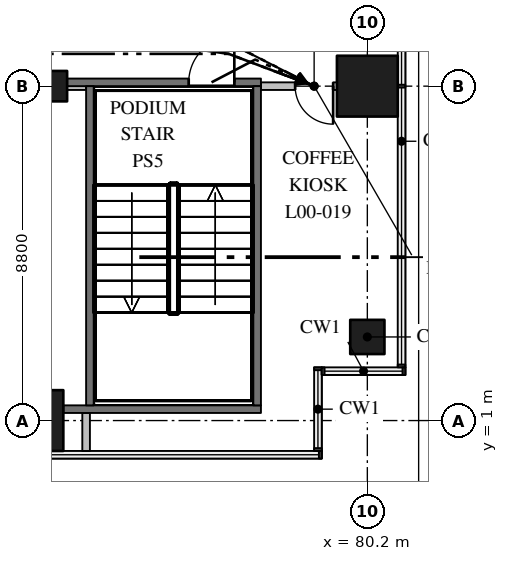
"""IFC4 building model, lengths in metres.
Left out: names, types, materials, properties, quantities, classifications, styles, units other than length and angle.
Written with IfcOpenShell. Run it as: python <this file> out.ifc"""

import sys

from ifc_helpers import new_model, si_unit, direction, frame, frame_2d, origin, origin_2d, place, context, subcontext, project, spatial, rectangle, extrude, element, fill, save


model = new_model("IFC4")
c1 = context("Model", 3, precision=1e-05, world=origin(), true_north=direction((0.0, 1.0)))
c2 = subcontext(c1, "Body", "Model", "MODEL_VIEW")
j1 = project(units=[si_unit("LENGTHUNIT", "METRE"), si_unit("PLANEANGLEUNIT", "RADIAN")], contexts=[c1])
p1 = place(None, origin())
s1 = spatial("IfcSite", under=j1, at=p1, CompositionType="ELEMENT")
p2 = place(p1, origin())
s2 = spatial("IfcBuilding", under=s1, at=p2, CompositionType="ELEMENT")
p3 = place(p2, origin())
s3 = spatial("IfcBuildingStorey", under=s2, at=p3, CompositionType="ELEMENT", Elevation=0.0)
p4 = place(p3, frame((71.4, 1.0, 0.0), z_axis=(0.0, 0.0, 1.0), x_axis=(1.0, 0.0, 0.0)))
e1 = element("IfcColumn", 1, at=p4, inside=s3, PredefinedType="COLUMN", context=c2, shape_type="SweptSolid", body=[
    extrude(rectangle(XDim=1.6, YDim=1.6, at=origin_2d()), origin(), (0.0, 0.0, 1.0), 7.5),
])
p5 = place(p3, frame((71.4, 9.8, 0.0), z_axis=(0.0, 0.0, 1.0), x_axis=(1.0, 0.0, 0.0)))
e2 = element("IfcColumn", 2, at=p5, inside=s3, PredefinedType="COLUMN", context=c2, shape_type="SweptSolid", body=[
    extrude(rectangle(XDim=1.8, YDim=0.8, at=origin_2d()), origin(), (0.0, 0.0, 1.0), 7.5),
])
p6 = place(p3, frame((80.2, 3.2, 0.0), z_axis=(0.0, 0.0, 1.0), x_axis=(1.0, 0.0, 0.0)))
e3 = element("IfcColumn", 3, at=p6, inside=s3, PredefinedType="COLUMN", context=c2, shape_type="SweptSolid", body=[
    extrude(rectangle(XDim=0.9, YDim=0.9, at=origin_2d()), origin(), (0.0, 0.0, 1.0), 7.5),
])
p7 = place(p3, frame((80.2, 9.8, 0.0), z_axis=(0.0, 0.0, 1.0), x_axis=(1.0, 0.0, 0.0)))
e4 = element("IfcColumn", 4, at=p7, inside=s3, PredefinedType="COLUMN", context=c2, shape_type="SweptSolid", body=[
    extrude(rectangle(XDim=1.6, YDim=1.6, at=origin_2d()), origin(), (0.0, 0.0, 1.0), 7.5),
])
p8 = place(p3, frame((72.3, 9.9, 0.0), z_axis=(0.0, 0.0, 1.0), x_axis=(1.0, 0.0, 0.0)))
e5 = element("IfcWall", 5, at=p8, inside=s3, PredefinedType="SHEAR", context=c2, shape_type="SweptSolid", body=[
    extrude(rectangle(XDim=5.1, YDim=0.2, at=frame_2d((2.55, 0.0))), origin(), (0.0, 0.0, 1.0), 7.1),
])
p9 = place(p8, frame((3.2, 0.0, 0.0)))
e6 = element("IfcOpeningElement", 6, at=p9, cuts=e5, PredefinedType="OPENING", context=c2, shape_type="SweptSolid", body=[
    extrude(rectangle(XDim=1.2, YDim=2.1, at=frame_2d((0.6, 1.05))), frame((0.0, 0.11, 0.0), z_axis=(0.0, -1.0, 0.0), x_axis=(1.0, 0.0, 0.0)), (0.0, 0.0, 1.0), 0.22),
])
p10 = place(p3, frame((72.2, 1.3, 0.0), z_axis=(0.0, 0.0, 1.0), x_axis=(1.0, 0.0, 0.0)))
e7 = element("IfcWall", 7, at=p10, inside=s3, PredefinedType="SHEAR", context=c2, shape_type="SweptSolid", body=[
    extrude(rectangle(XDim=5.2, YDim=0.2, at=frame_2d((2.6, 0.0))), origin(), (0.0, 0.0, 1.0), 7.1),
])
for number, where, z_axis, x_axis in (
    (8, (72.9, 1.4, 0.0), (0.0, 0.0, 1.0), (0.0, 1.0, 0.0)),
    (9, (77.3, 1.4, 0.0), (0.0, 0.0, 1.0), (0.0, 1.0, 0.0)),
):
    element("IfcWall", number, at=place(p3, frame(where, z_axis=z_axis, x_axis=x_axis)), inside=s3, PredefinedType="SHEAR", context=c2, shape_type="SweptSolid", body=[
        extrude(rectangle(XDim=8.4, YDim=0.2, at=frame_2d((4.2, 0.0))), origin(), (0.0, 0.0, 1.0), 7.1),
    ])
p11 = place(p3, frame((69.0, 9.8, 0.0), z_axis=(0.0, 0.0, 1.0), x_axis=(1.0, 0.0, 0.0)))
e10 = element("IfcWall", 10, at=p11, inside=s3, PredefinedType="PARTITIONING", context=c2, shape_type="SweptSolid", body=[
    extrude(rectangle(XDim=3.8, YDim=0.2, at=frame_2d((1.9, 0.0))), origin(), (0.0, 0.0, 1.0), 7.1),
])
p12 = place(p11, frame((0.4, 0.0, 0.0)))
e11 = element("IfcOpeningElement", 11, at=p12, cuts=e10, PredefinedType="OPENING", context=c2, shape_type="SweptSolid", body=[
    extrude(rectangle(XDim=1.0, YDim=2.1, at=frame_2d((0.5, 1.05))), frame((0.0, 0.11, 0.0), z_axis=(0.0, -1.0, 0.0), x_axis=(1.0, 0.0, 0.0)), (0.0, 0.0, 1.0), 0.22),
])
p13 = place(p3, frame((77.4, 9.8, 0.0), z_axis=(0.0, 0.0, 1.0), x_axis=(1.0, 0.0, 0.0)))
e12 = element("IfcWall", 12, at=p13, inside=s3, PredefinedType="PARTITIONING", context=c2, shape_type="SweptSolid", body=[
    extrude(rectangle(XDim=3.6, YDim=0.2, at=frame_2d((1.8, 0.0))), origin(), (0.0, 0.0, 1.0), 7.1),
])
p14 = place(p13, frame((0.9, 0.0, 0.0)))
e13 = element("IfcOpeningElement", 13, at=p14, cuts=e12, PredefinedType="OPENING", context=c2, shape_type="SweptSolid", body=[
    extrude(rectangle(XDim=1.0, YDim=2.1, at=frame_2d((0.5, 1.05))), frame((0.0, 0.11, 0.0), z_axis=(0.0, -1.0, 0.0), x_axis=(1.0, 0.0, 0.0)), (0.0, 0.0, 1.0), 0.22),
])
p15 = place(p3, frame((72.8, 0.2, 0.0), z_axis=(0.0, 0.0, 1.0), x_axis=(0.0, 1.0, 0.0)))
e14 = element("IfcWall", 14, at=p15, inside=s3, PredefinedType="PARTITIONING", context=c2, shape_type="SweptSolid", body=[
    extrude(rectangle(XDim=1.0, YDim=0.2, at=frame_2d((0.5, 0.0))), origin(), (0.0, 0.0, 1.0), 7.1),
])
p16 = place(p9, origin())
e15 = element("IfcDoor", 15, at=p16, inside=s3, OperationType="SINGLE_SWING_RIGHT", PredefinedType="DOOR", context=c2, shape_type="SweptSolid", body=[
    extrude(rectangle(XDim=1.2, YDim=2.1, at=frame_2d((0.6, 1.05))), frame((0.0, 0.025, 0.0), z_axis=(0.0, -1.0, 0.0), x_axis=(1.0, 0.0, 0.0)), (0.0, 0.0, 1.0), 0.05),
])
fill(e6, e15)
p17 = place(p14, frame((1.0, 0.0, 0.0), z_axis=(0.0, 0.0, 1.0), x_axis=(-1.0, 0.0, 0.0)))
e16 = element("IfcDoor", 16, at=p17, inside=s3, OperationType="SINGLE_SWING_RIGHT", PredefinedType="DOOR", context=c2, shape_type="SweptSolid", body=[
    extrude(rectangle(XDim=1.0, YDim=2.1, at=frame_2d((0.5, 1.05))), frame((0.0, 0.025, 0.0), z_axis=(0.0, -1.0, 0.0), x_axis=(1.0, 0.0, 0.0)), (0.0, 0.0, 1.0), 0.05),
])
fill(e13, e16)
save(model, sys.argv[1])
